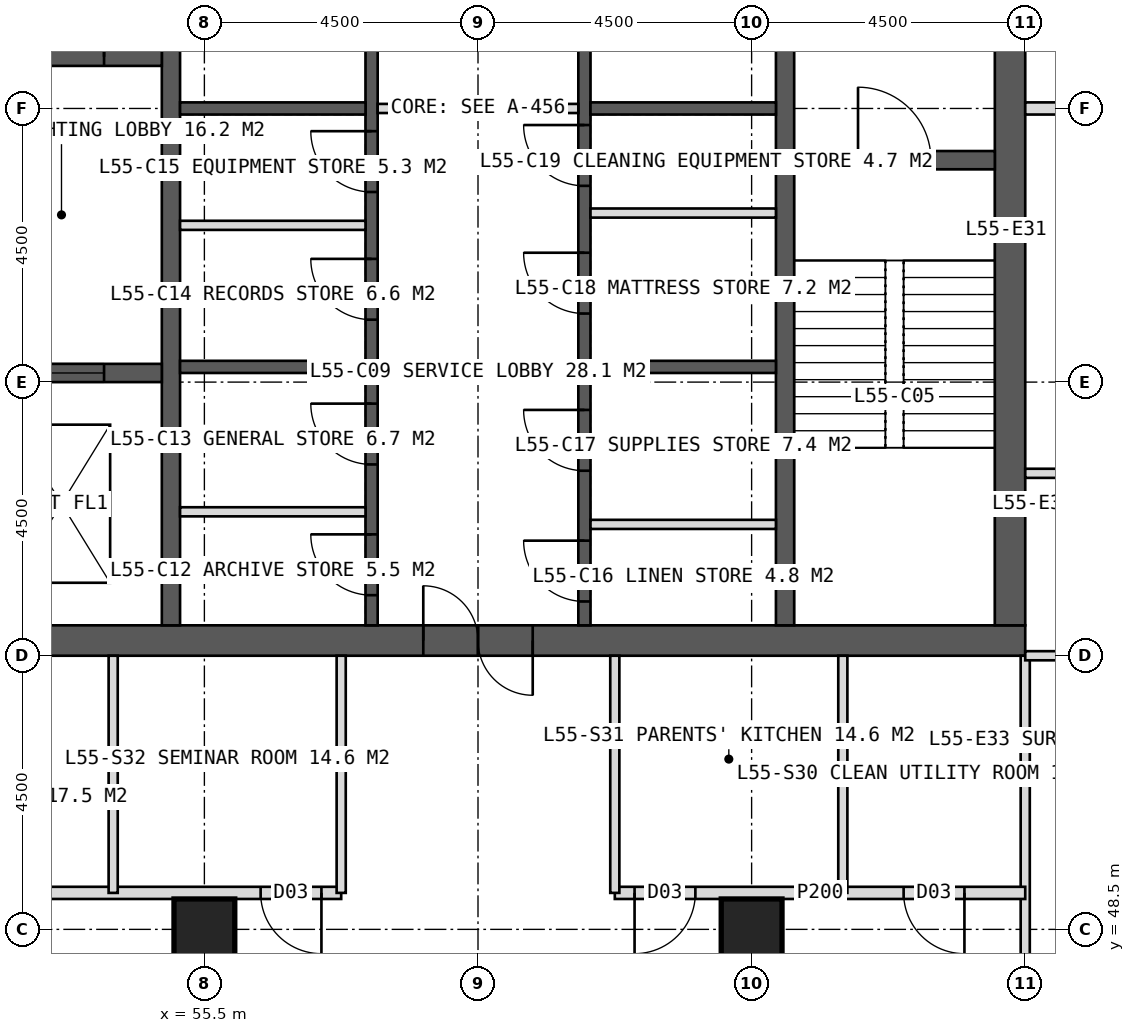
"""IFC4 building model, lengths in metres.
Left out: names, types, materials, properties, quantities, classifications, styles, units other than length and angle.
Written with IfcOpenShell. Run it as: python <this file> out.ifc"""

import sys

from ifc_helpers import new_model, si_unit, direction, frame, frame_2d, origin, origin_2d, place, context, subcontext, project, spatial, rectangle, hollow_rectangle, extrude, element, fill, save


model = new_model("IFC4")
c1 = context("Model", 3, precision=1e-05, world=origin(), true_north=direction((0.0, 1.0)))
c2 = subcontext(c1, "Body", "Model", "MODEL_VIEW")
j1 = project(units=[si_unit("LENGTHUNIT", "METRE"), si_unit("PLANEANGLEUNIT", "RADIAN")], contexts=[c1])
p1 = place(None, origin())
s1 = spatial("IfcSite", under=j1, at=p1, CompositionType="ELEMENT")
p2 = place(p1, origin())
s2 = spatial("IfcBuilding", under=s1, at=p2, CompositionType="ELEMENT")
p3 = place(p2, frame((0.0, 0.0, 229.0)))
s3 = spatial("IfcBuildingStorey", under=s2, at=p3, CompositionType="ELEMENT", Elevation=229.0)
p4 = place(p3, frame((51.0, 53.25, 0.0), z_axis=(0.0, 0.0, 1.0), x_axis=(1.0, 0.0, 0.0)))
e1 = element("IfcWall", 1, at=p4, inside=s3, PredefinedType="SHEAR", context=c2, shape_type="SweptSolid", body=[
    extrude(rectangle(XDim=18.0, YDim=0.5, at=frame_2d((9.0, 0.0))), origin(), (0.0, 0.0, 1.0), 4.0),
])
p5 = place(p4, frame((8.1, 0.0, 0.0)))
e2 = element("IfcOpeningElement", 2, at=p5, cuts=e1, PredefinedType="OPENING", context=c2, shape_type="SweptSolid", body=[
    extrude(rectangle(XDim=1.8, YDim=2.2, at=frame_2d((0.9, 1.1))), frame((0.0, 0.26, 0.0), z_axis=(0.0, -1.0, 0.0), x_axis=(1.0, 0.0, 0.0)), (0.0, 0.0, 1.0), 0.52),
])
p6 = place(p3, frame((68.75, 53.5, 0.0), z_axis=(0.0, 0.0, 1.0), x_axis=(0.0, 1.0, 0.0)))
e3 = element("IfcWall", 3, at=p6, inside=s3, PredefinedType="SHEAR", context=c2, shape_type="SweptSolid", body=[
    extrude(rectangle(XDim=17.0, YDim=0.5, at=frame_2d((8.5, 0.0))), origin(), (0.0, 0.0, 1.0), 4.0),
])
p7 = place(p6, frame((9.6, 0.0, 0.0)))
e4 = element("IfcOpeningElement", 4, at=p7, cuts=e3, PredefinedType="OPENING", context=c2, shape_type="SweptSolid", body=[
    extrude(rectangle(XDim=1.5, YDim=2.2, at=frame_2d((0.75, 1.1))), frame((0.0, 0.26, 0.0), z_axis=(0.0, -1.0, 0.0), x_axis=(1.0, 0.0, 0.0)), (0.0, 0.0, 1.0), 0.52),
])
for number, where, z_axis, x_axis in (
    (5, (54.95, 53.5, 0.0), (0.0, 0.0, 1.0), (0.0, 1.0, 0.0)),
    (6, (65.05, 53.5, 0.0), (0.0, 0.0, 1.0), (0.0, 1.0, 0.0)),
):
    element("IfcWall", number, at=place(p3, frame(where, z_axis=z_axis, x_axis=x_axis)), inside=s3, PredefinedType="SHEAR", context=c2, shape_type="SweptSolid", body=[
        extrude(rectangle(XDim=17.0, YDim=0.3, at=frame_2d((8.5, 0.0))), origin(), (0.0, 0.0, 1.0), 4.0),
    ])
p8 = place(p3, frame((58.25, 53.5, 0.0), z_axis=(0.0, 0.0, 1.0), x_axis=(0.0, 1.0, 0.0)))
e7 = element("IfcWall", 7, at=p8, inside=s3, PredefinedType="SHEAR", context=c2, shape_type="SweptSolid", body=[
    extrude(rectangle(XDim=17.0, YDim=0.2, at=frame_2d((8.5, 0.0))), origin(), (0.0, 0.0, 1.0), 4.0),
])
p9 = place(p8, frame((0.496, 0.0, 0.0)))
e8 = element("IfcOpeningElement", 8, at=p9, cuts=e7, PredefinedType="OPENING", context=c2, shape_type="SweptSolid", body=[
    extrude(rectangle(XDim=1.0, YDim=2.1, at=frame_2d((0.5, 1.05))), frame((0.0, 0.11, 0.0), z_axis=(0.0, -1.0, 0.0), x_axis=(1.0, 0.0, 0.0)), (0.0, 0.0, 1.0), 0.22),
])
p10 = place(p8, frame((2.646, 0.0, 0.0)))
e9 = element("IfcOpeningElement", 9, at=p10, cuts=e7, PredefinedType="OPENING", context=c2, shape_type="SweptSolid", body=[
    extrude(rectangle(XDim=1.0, YDim=2.1, at=frame_2d((0.5, 1.05))), frame((0.0, 0.11, 0.0), z_axis=(0.0, -1.0, 0.0), x_axis=(1.0, 0.0, 0.0)), (0.0, 0.0, 1.0), 0.22),
])
p11 = place(p8, frame((5.027, 0.0, 0.0)))
e10 = element("IfcOpeningElement", 10, at=p11, cuts=e7, PredefinedType="OPENING", context=c2, shape_type="SweptSolid", body=[
    extrude(rectangle(XDim=1.0, YDim=2.1, at=frame_2d((0.5, 1.05))), frame((0.0, 0.11, 0.0), z_axis=(0.0, -1.0, 0.0), x_axis=(1.0, 0.0, 0.0)), (0.0, 0.0, 1.0), 0.22),
])
p12 = place(p8, frame((7.126, 0.0, 0.0)))
e11 = element("IfcOpeningElement", 11, at=p12, cuts=e7, PredefinedType="OPENING", context=c2, shape_type="SweptSolid", body=[
    extrude(rectangle(XDim=1.0, YDim=2.1, at=frame_2d((0.5, 1.05))), frame((0.0, 0.11, 0.0), z_axis=(0.0, -1.0, 0.0), x_axis=(1.0, 0.0, 0.0)), (0.0, 0.0, 1.0), 0.22),
])
p13 = place(p8, frame((10.025, 0.0, 0.0)))
e12 = element("IfcOpeningElement", 12, at=p13, cuts=e7, PredefinedType="OPENING", context=c2, shape_type="SweptSolid", body=[
    extrude(rectangle(XDim=1.4, YDim=2.2, at=frame_2d((0.7, 1.1))), frame((0.0, 0.11, 0.0), z_axis=(0.0, -1.0, 0.0), x_axis=(1.0, 0.0, 0.0)), (0.0, 0.0, 1.0), 0.22),
])
p14 = place(p8, frame((14.325, 0.0, 0.0)))
e13 = element("IfcOpeningElement", 13, at=p14, cuts=e7, PredefinedType="OPENING", context=c2, shape_type="SweptSolid", body=[
    extrude(rectangle(XDim=1.4, YDim=2.2, at=frame_2d((0.7, 1.1))), frame((0.0, 0.11, 0.0), z_axis=(0.0, -1.0, 0.0), x_axis=(1.0, 0.0, 0.0)), (0.0, 0.0, 1.0), 0.22),
])
p15 = place(p3, frame((61.75, 53.5, 0.0), z_axis=(0.0, 0.0, 1.0), x_axis=(0.0, 1.0, 0.0)))
e14 = element("IfcWall", 14, at=p15, inside=s3, PredefinedType="SHEAR", context=c2, shape_type="SweptSolid", body=[
    extrude(rectangle(XDim=17.0, YDim=0.2, at=frame_2d((8.5, 0.0))), origin(), (0.0, 0.0, 1.0), 4.0),
])
p16 = place(p15, frame((0.393, 0.0, 0.0)))
e15 = element("IfcOpeningElement", 15, at=p16, cuts=e14, PredefinedType="OPENING", context=c2, shape_type="SweptSolid", body=[
    extrude(rectangle(XDim=1.0, YDim=2.1, at=frame_2d((0.5, 1.05))), frame((0.0, 0.11, 0.0), z_axis=(0.0, -1.0, 0.0), x_axis=(1.0, 0.0, 0.0)), (0.0, 0.0, 1.0), 0.22),
])
p17 = place(p15, frame((2.542, 0.0, 0.0)))
e16 = element("IfcOpeningElement", 16, at=p17, cuts=e14, PredefinedType="OPENING", context=c2, shape_type="SweptSolid", body=[
    extrude(rectangle(XDim=1.0, YDim=2.1, at=frame_2d((0.5, 1.05))), frame((0.0, 0.11, 0.0), z_axis=(0.0, -1.0, 0.0), x_axis=(1.0, 0.0, 0.0)), (0.0, 0.0, 1.0), 0.22),
])
p18 = place(p15, frame((5.127, 0.0, 0.0)))
e17 = element("IfcOpeningElement", 17, at=p18, cuts=e14, PredefinedType="OPENING", context=c2, shape_type="SweptSolid", body=[
    extrude(rectangle(XDim=1.0, YDim=2.1, at=frame_2d((0.5, 1.05))), frame((0.0, 0.11, 0.0), z_axis=(0.0, -1.0, 0.0), x_axis=(1.0, 0.0, 0.0)), (0.0, 0.0, 1.0), 0.22),
])
p19 = place(p15, frame((7.228, 0.0, 0.0)))
e18 = element("IfcOpeningElement", 18, at=p19, cuts=e14, PredefinedType="OPENING", context=c2, shape_type="SweptSolid", body=[
    extrude(rectangle(XDim=1.0, YDim=2.1, at=frame_2d((0.5, 1.05))), frame((0.0, 0.11, 0.0), z_axis=(0.0, -1.0, 0.0), x_axis=(1.0, 0.0, 0.0)), (0.0, 0.0, 1.0), 0.22),
])
p20 = place(p15, frame((10.025, 0.0, 0.0)))
e19 = element("IfcOpeningElement", 19, at=p20, cuts=e14, PredefinedType="OPENING", context=c2, shape_type="SweptSolid", body=[
    extrude(rectangle(XDim=1.4, YDim=2.2, at=frame_2d((0.7, 1.1))), frame((0.0, 0.11, 0.0), z_axis=(0.0, -1.0, 0.0), x_axis=(1.0, 0.0, 0.0)), (0.0, 0.0, 1.0), 0.22),
])
p21 = place(p15, frame((14.325, 0.0, 0.0)))
e20 = element("IfcOpeningElement", 20, at=p21, cuts=e14, PredefinedType="OPENING", context=c2, shape_type="SweptSolid", body=[
    extrude(rectangle(XDim=1.4, YDim=2.2, at=frame_2d((0.7, 1.1))), frame((0.0, 0.11, 0.0), z_axis=(0.0, -1.0, 0.0), x_axis=(1.0, 0.0, 0.0)), (0.0, 0.0, 1.0), 0.22),
])
for number, where, z_axis, x_axis in (
    (21, (55.1, 57.75, 0.0), (0.0, 0.0, 1.0), (1.0, 0.0, 0.0)),
    (22, (61.85, 57.75, 0.0), (0.0, 0.0, 1.0), (1.0, 0.0, 0.0)),
    (23, (55.1, 62.0, 0.0), (0.0, 0.0, 1.0), (1.0, 0.0, 0.0)),
    (24, (61.85, 62.0, 0.0), (0.0, 0.0, 1.0), (1.0, 0.0, 0.0)),
):
    element("IfcWall", number, at=place(p3, frame(where, z_axis=z_axis, x_axis=x_axis)), inside=s3, PredefinedType="SHEAR", context=c2, shape_type="SweptSolid", body=[
        extrude(rectangle(XDim=3.05, YDim=0.2, at=frame_2d((1.525, 0.0))), origin(), (0.0, 0.0, 1.0), 4.0),
    ])
p22 = place(p3, frame((51.5, 62.85, 0.0), z_axis=(0.0, 0.0, 1.0), x_axis=(1.0, 0.0, 0.0)))
e25 = element("IfcWall", 25, at=p22, inside=s3, PredefinedType="SHEAR", context=c2, shape_type="SweptSolid", body=[
    extrude(rectangle(XDim=3.3, YDim=0.3, at=frame_2d((1.65, 0.0))), origin(), (0.0, 0.0, 1.0), 4.0),
])
p23 = place(p22, frame((1.15, 0.0, 0.0)))
e26 = element("IfcOpeningElement", 26, at=p23, cuts=e25, PredefinedType="OPENING", context=c2, shape_type="SweptSolid", body=[
    extrude(rectangle(XDim=1.2, YDim=2.1, at=frame_2d((0.6, 1.05))), frame((0.0, 0.16, 0.0), z_axis=(0.0, -1.0, 0.0), x_axis=(1.0, 0.0, 0.0)), (0.0, 0.0, 1.0), 0.32),
])
p24 = place(p3, frame((51.5, 57.65, 0.0), z_axis=(0.0, 0.0, 1.0), x_axis=(1.0, 0.0, 0.0)))
e27 = element("IfcWall", 27, at=p24, inside=s3, PredefinedType="SHEAR", context=c2, shape_type="SweptSolid", body=[
    extrude(rectangle(XDim=3.3, YDim=0.3, at=frame_2d((1.65, 0.0))), origin(), (0.0, 0.0, 1.0), 4.0),
])
p25 = place(p24, frame((1.15, 0.0, 0.0)))
e28 = element("IfcOpeningElement", 28, at=p25, cuts=e27, PredefinedType="OPENING", context=c2, shape_type="SweptSolid", body=[
    extrude(rectangle(XDim=1.2, YDim=2.2, at=frame_2d((0.6, 1.1))), frame((0.0, 0.16, 0.0), z_axis=(0.0, -1.0, 0.0), x_axis=(1.0, 0.0, 0.0)), (0.0, 0.0, 1.0), 0.32),
])
p26 = place(p3, frame((65.2, 61.15, 0.0), z_axis=(0.0, 0.0, 1.0), x_axis=(1.0, 0.0, 0.0)))
e29 = element("IfcWall", 29, at=p26, inside=s3, PredefinedType="SHEAR", context=c2, shape_type="SweptSolid", body=[
    extrude(rectangle(XDim=3.3, YDim=0.3, at=frame_2d((1.65, 0.0))), origin(), (0.0, 0.0, 1.0), 4.0),
])
p27 = place(p26, frame((1.05, 0.0, 0.0)))
e30 = element("IfcOpeningElement", 30, at=p27, cuts=e29, PredefinedType="OPENING", context=c2, shape_type="SweptSolid", body=[
    extrude(rectangle(XDim=1.2, YDim=2.1, at=frame_2d((0.6, 1.05))), frame((0.0, 0.16, 0.0), z_axis=(0.0, -1.0, 0.0), x_axis=(1.0, 0.0, 0.0)), (0.0, 0.0, 1.0), 0.32),
])
for number, where, z_axis, x_axis in (
    (31, (55.5, 48.5, 0.0), (0.0, 0.0, 1.0), (1.0, 0.0, 0.0)),
    (32, (64.5, 48.5, 0.0), (0.0, 0.0, 1.0), (1.0, 0.0, 0.0)),
):
    element("IfcColumn", number, at=place(p3, frame(where, z_axis=z_axis, x_axis=x_axis)), inside=s3, PredefinedType="COLUMN", context=c2, shape_type="SweptSolid", body=[
        extrude(hollow_rectangle(XDim=1.0, YDim=1.0, WallThickness=0.1, at=origin_2d()), origin(), (0.0, 0.0, 1.0), 4.0),
    ])
p28 = place(p3, frame((69.0, 53.0, 0.0), z_axis=(0.0, 0.0, 1.0), x_axis=(0.0, -1.0, 0.0)))
e33 = element("IfcWall", 33, at=p28, inside=s3, PredefinedType="PARTITIONING", context=c2, shape_type="SweptSolid", body=[
    extrude(rectangle(XDim=5.4, YDim=0.15, at=frame_2d((2.7, 0.0))), origin(), (0.0, 0.0, 1.0), 3.75),
])
p29 = place(p3, frame((69.0, 49.1, 0.0), z_axis=(0.0, 0.0, 1.0), x_axis=(-1.0, 0.0, 0.0)))
e34 = element("IfcWall", 34, at=p29, inside=s3, PredefinedType="PARTITIONING", context=c2, shape_type="SweptSolid", body=[
    extrude(rectangle(XDim=6.75, YDim=0.2, at=frame_2d((3.375, 0.0))), origin(), (0.0, 0.0, 1.0), 3.75),
])
p30 = place(p29, frame((1.0, 0.0, 0.0)))
e35 = element("IfcOpeningElement", 35, at=p30, cuts=e34, PredefinedType="OPENING", context=c2, shape_type="SweptSolid", body=[
    extrude(rectangle(XDim=1.0, YDim=2.1, at=frame_2d((0.5, 1.05))), frame((0.0, 0.11, 0.0), z_axis=(0.0, -1.0, 0.0), x_axis=(1.0, 0.0, 0.0)), (0.0, 0.0, 1.0), 0.22),
])
p31 = place(p29, frame((5.425, 0.0, 0.0)))
e36 = element("IfcOpeningElement", 36, at=p31, cuts=e34, PredefinedType="OPENING", context=c2, shape_type="SweptSolid", body=[
    extrude(rectangle(XDim=1.0, YDim=2.1, at=frame_2d((0.5, 1.05))), frame((0.0, 0.11, 0.0), z_axis=(0.0, -1.0, 0.0), x_axis=(1.0, 0.0, 0.0)), (0.0, 0.0, 1.0), 0.22),
])
p32 = place(p3, frame((57.75, 49.1, 0.0), z_axis=(0.0, 0.0, 1.0), x_axis=(-1.0, 0.0, 0.0)))
e37 = element("IfcWall", 37, at=p32, inside=s3, PredefinedType="PARTITIONING", context=c2, shape_type="SweptSolid", body=[
    extrude(rectangle(XDim=12.15, YDim=0.2, at=frame_2d((6.075, 0.0))), origin(), (0.0, 0.0, 1.0), 3.75),
])
p33 = place(p32, frame((0.325, 0.0, 0.0)))
e38 = element("IfcOpeningElement", 38, at=p33, cuts=e37, PredefinedType="OPENING", context=c2, shape_type="SweptSolid", body=[
    extrude(rectangle(XDim=1.0, YDim=2.1, at=frame_2d((0.5, 1.05))), frame((0.0, 0.11, 0.0), z_axis=(0.0, -1.0, 0.0), x_axis=(1.0, 0.0, 0.0)), (0.0, 0.0, 1.0), 0.22),
])
p34 = place(p32, frame((5.5, 0.0, 0.0)))
e39 = element("IfcOpeningElement", 39, at=p34, cuts=e37, PredefinedType="OPENING", context=c2, shape_type="SweptSolid", body=[
    extrude(rectangle(XDim=1.0, YDim=2.1, at=frame_2d((0.5, 1.05))), frame((0.0, 0.11, 0.0), z_axis=(0.0, -1.0, 0.0), x_axis=(1.0, 0.0, 0.0)), (0.0, 0.0, 1.0), 0.22),
])
p35 = place(p32, frame((8.95, 0.0, 0.0)))
e40 = element("IfcOpeningElement", 40, at=p35, cuts=e37, PredefinedType="OPENING", context=c2, shape_type="SweptSolid", body=[
    extrude(rectangle(XDim=1.0, YDim=2.1, at=frame_2d((0.5, 1.05))), frame((0.0, 0.11, 0.0), z_axis=(0.0, -1.0, 0.0), x_axis=(1.0, 0.0, 0.0)), (0.0, 0.0, 1.0), 0.22),
])
for number, where, z_axis, x_axis in (
    (41, (62.25, 53.0, 0.0), (0.0, 0.0, 1.0), (0.0, -1.0, 0.0)),
    (42, (57.75, 53.0, 0.0), (0.0, 0.0, 1.0), (0.0, -1.0, 0.0)),
    (43, (66.0, 53.0, 0.0), (0.0, 0.0, 1.0), (0.0, -1.0, 0.0)),
    (44, (54.0, 53.0, 0.0), (0.0, 0.0, 1.0), (0.0, -1.0, 0.0)),
):
    element("IfcWall", number, at=place(p3, frame(where, z_axis=z_axis, x_axis=x_axis)), inside=s3, PredefinedType="PARTITIONING", context=c2, shape_type="SweptSolid", body=[
        extrude(rectangle(XDim=3.9, YDim=0.15, at=frame_2d((1.95, 0.0))), origin(), (0.0, 0.0, 1.0), 3.75),
    ])
p36 = place(p3, frame((69.0, 62.0, 0.0), z_axis=(0.0, 0.0, 1.0), x_axis=(1.0, 0.0, 0.0)))
e45 = element("IfcWall", 45, at=p36, inside=s3, PredefinedType="SOLIDWALL", context=c2, shape_type="SweptSolid", body=[
    extrude(rectangle(XDim=5.4, YDim=0.2, at=frame_2d((2.7, 0.0))), origin(), (0.0, 0.0, 1.0), 2.95),
])
for number, where, z_axis, x_axis in (
    (46, (69.0, 56.0, 0.0), (0.0, 0.0, 1.0), (1.0, 0.0, 0.0)),
    (47, (69.0, 53.0, 0.0), (0.0, 0.0, 1.0), (1.0, 0.0, 0.0)),
):
    element("IfcWall", number, at=place(p3, frame(where, z_axis=z_axis, x_axis=x_axis)), inside=s3, PredefinedType="PARTITIONING", context=c2, shape_type="SweptSolid", body=[
        extrude(rectangle(XDim=5.4, YDim=0.15, at=frame_2d((2.7, 0.0))), origin(), (0.0, 0.0, 1.0), 3.75),
    ])
for number, where, z_axis, x_axis in (
    (48, (55.1, 55.367, 0.0), (0.0, 0.0, 1.0), (1.0, 0.0, 0.0)),
    (49, (61.85, 55.16, 0.0), (0.0, 0.0, 1.0), (1.0, 0.0, 0.0)),
    (50, (55.1, 60.078, 0.0), (0.0, 0.0, 1.0), (1.0, 0.0, 0.0)),
    (51, (61.85, 60.28, 0.0), (0.0, 0.0, 1.0), (1.0, 0.0, 0.0)),
):
    element("IfcWall", number, at=place(p3, frame(where, z_axis=z_axis, x_axis=x_axis)), inside=s3, PredefinedType="PARTITIONING", context=c2, shape_type="SweptSolid", body=[
        extrude(rectangle(XDim=3.05, YDim=0.15, at=frame_2d((1.525, 0.0))), origin(), (0.0, 0.0, 1.0), 3.75),
    ])
p37 = place(p3, frame((58.35, 62.0, 0.0), z_axis=(0.0, 0.0, 1.0), x_axis=(1.0, 0.0, 0.0)))
e52 = element("IfcWall", 52, at=p37, inside=s3, PredefinedType="PARTITIONING", context=c2, shape_type="SweptSolid", body=[
    extrude(rectangle(XDim=3.3, YDim=0.15, at=frame_2d((1.65, 0.0))), origin(), (0.0, 0.0, 1.0), 3.75),
])
p38 = place(p30, origin())
e53 = element("IfcDoor", 53, at=p38, inside=s3, OperationType="SINGLE_SWING_LEFT", PredefinedType="DOOR", context=c2, shape_type="SweptSolid", body=[
    extrude(rectangle(XDim=1.0, YDim=2.1, at=frame_2d((0.5, 1.05))), frame((0.0, 0.025, 0.0), z_axis=(0.0, -1.0, 0.0), x_axis=(1.0, 0.0, 0.0)), (0.0, 0.0, 1.0), 0.05),
])
fill(e35, e53)
p39 = place(p31, origin())
e54 = element("IfcDoor", 54, at=p39, inside=s3, OperationType="SINGLE_SWING_RIGHT", PredefinedType="DOOR", context=c2, shape_type="SweptSolid", body=[
    extrude(rectangle(XDim=1.0, YDim=2.1, at=frame_2d((0.5, 1.05))), frame((0.0, 0.025, 0.0), z_axis=(0.0, -1.0, 0.0), x_axis=(1.0, 0.0, 0.0)), (0.0, 0.0, 1.0), 0.05),
])
fill(e36, e54)
p40 = place(p33, origin())
e55 = element("IfcDoor", 55, at=p40, inside=s3, OperationType="SINGLE_SWING_LEFT", PredefinedType="DOOR", context=c2, shape_type="SweptSolid", body=[
    extrude(rectangle(XDim=1.0, YDim=2.1, at=frame_2d((0.5, 1.05))), frame((0.0, 0.025, 0.0), z_axis=(0.0, -1.0, 0.0), x_axis=(1.0, 0.0, 0.0)), (0.0, 0.0, 1.0), 0.05),
])
fill(e38, e55)
p41 = place(p23, origin())
e56 = element("IfcDoor", 56, at=p41, inside=s3, OperationType="SINGLE_SWING_RIGHT", PredefinedType="DOOR", context=c2, shape_type="SweptSolid", body=[
    extrude(rectangle(XDim=1.2, YDim=2.1, at=frame_2d((0.6, 1.05))), frame((0.0, 0.025, 0.0), z_axis=(0.0, -1.0, 0.0), x_axis=(1.0, 0.0, 0.0)), (0.0, 0.0, 1.0), 0.05),
])
fill(e26, e56)
p42 = place(p27, origin())
e57 = element("IfcDoor", 57, at=p42, inside=s3, OperationType="SINGLE_SWING_LEFT", PredefinedType="DOOR", context=c2, shape_type="SweptSolid", body=[
    extrude(rectangle(XDim=1.2, YDim=2.1, at=frame_2d((0.6, 1.05))), frame((0.0, 0.025, 0.0), z_axis=(0.0, -1.0, 0.0), x_axis=(1.0, 0.0, 0.0)), (0.0, 0.0, 1.0), 0.05),
])
fill(e30, e57)
p43 = place(p25, origin())
e58 = element("IfcDoor", 58, at=p43, inside=s3, OperationType="SLIDING_TO_LEFT", PredefinedType="DOOR", context=c2, shape_type="SweptSolid", body=[
    extrude(rectangle(XDim=1.2, YDim=2.2, at=frame_2d((0.6, 1.1))), frame((0.0, 0.025, 0.0), z_axis=(0.0, -1.0, 0.0), x_axis=(1.0, 0.0, 0.0)), (0.0, 0.0, 1.0), 0.05),
])
fill(e28, e58)
p44 = place(p9, origin())
e59 = element("IfcDoor", 59, at=p44, inside=s3, OperationType="SINGLE_SWING_RIGHT", PredefinedType="DOOR", context=c2, shape_type="SweptSolid", body=[
    extrude(rectangle(XDim=1.0, YDim=2.1, at=frame_2d((0.5, 1.05))), frame((0.0, 0.025, 0.0), z_axis=(0.0, -1.0, 0.0), x_axis=(1.0, 0.0, 0.0)), (0.0, 0.0, 1.0), 0.05),
])
fill(e8, e59)
p45 = place(p10, origin())
e60 = element("IfcDoor", 60, at=p45, inside=s3, OperationType="SINGLE_SWING_RIGHT", PredefinedType="DOOR", context=c2, shape_type="SweptSolid", body=[
    extrude(rectangle(XDim=1.0, YDim=2.1, at=frame_2d((0.5, 1.05))), frame((0.0, 0.025, 0.0), z_axis=(0.0, -1.0, 0.0), x_axis=(1.0, 0.0, 0.0)), (0.0, 0.0, 1.0), 0.05),
])
fill(e9, e60)
p46 = place(p16, origin())
e61 = element("IfcDoor", 61, at=p46, inside=s3, OperationType="SINGLE_SWING_RIGHT", PredefinedType="DOOR", context=c2, shape_type="SweptSolid", body=[
    extrude(rectangle(XDim=1.0, YDim=2.1, at=frame_2d((0.5, 1.05))), frame((0.0, 0.025, 0.0), z_axis=(0.0, -1.0, 0.0), x_axis=(1.0, 0.0, 0.0)), (0.0, 0.0, 1.0), 0.05),
])
fill(e15, e61)
p47 = place(p17, origin())
e62 = element("IfcDoor", 62, at=p47, inside=s3, OperationType="SINGLE_SWING_RIGHT", PredefinedType="DOOR", context=c2, shape_type="SweptSolid", body=[
    extrude(rectangle(XDim=1.0, YDim=2.1, at=frame_2d((0.5, 1.05))), frame((0.0, 0.025, 0.0), z_axis=(0.0, -1.0, 0.0), x_axis=(1.0, 0.0, 0.0)), (0.0, 0.0, 1.0), 0.05),
])
fill(e16, e62)
p48 = place(p11, origin())
e63 = element("IfcDoor", 63, at=p48, inside=s3, OperationType="SINGLE_SWING_RIGHT", PredefinedType="DOOR", context=c2, shape_type="SweptSolid", body=[
    extrude(rectangle(XDim=1.0, YDim=2.1, at=frame_2d((0.5, 1.05))), frame((0.0, 0.025, 0.0), z_axis=(0.0, -1.0, 0.0), x_axis=(1.0, 0.0, 0.0)), (0.0, 0.0, 1.0), 0.05),
])
fill(e10, e63)
p49 = place(p12, origin())
e64 = element("IfcDoor", 64, at=p49, inside=s3, OperationType="SINGLE_SWING_RIGHT", PredefinedType="DOOR", context=c2, shape_type="SweptSolid", body=[
    extrude(rectangle(XDim=1.0, YDim=2.1, at=frame_2d((0.5, 1.05))), frame((0.0, 0.025, 0.0), z_axis=(0.0, -1.0, 0.0), x_axis=(1.0, 0.0, 0.0)), (0.0, 0.0, 1.0), 0.05),
])
fill(e11, e64)
p50 = place(p18, origin())
e65 = element("IfcDoor", 65, at=p50, inside=s3, OperationType="SINGLE_SWING_RIGHT", PredefinedType="DOOR", context=c2, shape_type="SweptSolid", body=[
    extrude(rectangle(XDim=1.0, YDim=2.1, at=frame_2d((0.5, 1.05))), frame((0.0, 0.025, 0.0), z_axis=(0.0, -1.0, 0.0), x_axis=(1.0, 0.0, 0.0)), (0.0, 0.0, 1.0), 0.05),
])
fill(e17, e65)
p51 = place(p19, origin())
e66 = element("IfcDoor", 66, at=p51, inside=s3, OperationType="SINGLE_SWING_RIGHT", PredefinedType="DOOR", context=c2, shape_type="SweptSolid", body=[
    extrude(rectangle(XDim=1.0, YDim=2.1, at=frame_2d((0.5, 1.05))), frame((0.0, 0.025, 0.0), z_axis=(0.0, -1.0, 0.0), x_axis=(1.0, 0.0, 0.0)), (0.0, 0.0, 1.0), 0.05),
])
fill(e18, e66)
p52 = place(p5, origin())
e67 = element("IfcDoor", 67, at=p52, inside=s3, OperationType="DOUBLE_DOOR_SINGLE_SWING", PredefinedType="DOOR", context=c2, shape_type="SweptSolid", body=[
    extrude(rectangle(XDim=1.8, YDim=2.2, at=frame_2d((0.9, 1.1))), frame((0.0, 0.025, 0.0), z_axis=(0.0, -1.0, 0.0), x_axis=(1.0, 0.0, 0.0)), (0.0, 0.0, 1.0), 0.05),
])
fill(e2, e67)
save(model, sys.argv[1])
